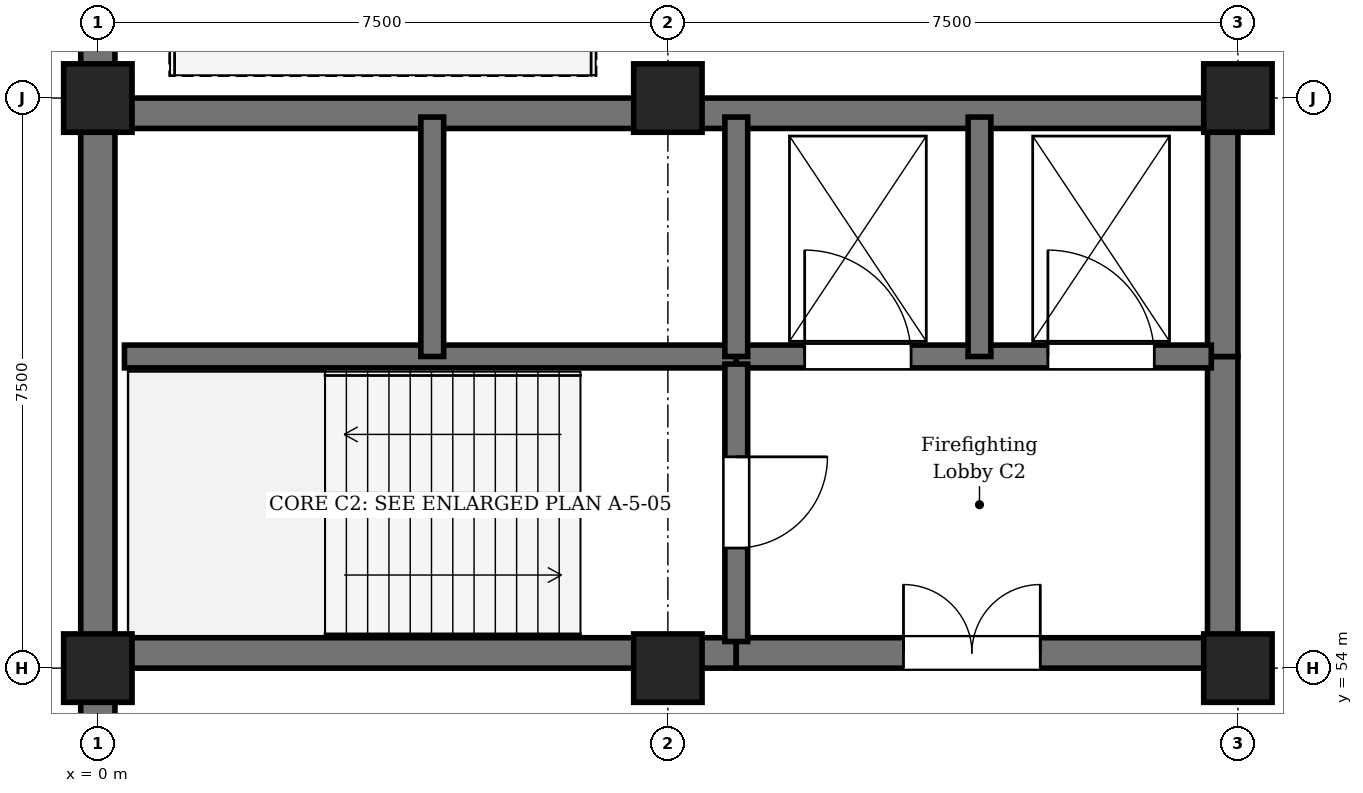
"""IFC4 building model, lengths in metres.
Left out: names, types, materials, properties, quantities, classifications, styles, units other than length and angle.
Written with IfcOpenShell. Run it as: python <this file> out.ifc"""

import sys

from ifc_helpers import new_model, si_unit, direction, frame, frame_2d, origin, origin_2d, place, context, subcontext, project, spatial, rectangle, circle, extrude, element, fill, save


model = new_model("IFC4")
c1 = context("Model", 3, precision=1e-05, world=origin(), true_north=direction((0.0, 1.0)))
c2 = subcontext(c1, "Body", "Model", "MODEL_VIEW")
j1 = project(units=[si_unit("LENGTHUNIT", "METRE"), si_unit("PLANEANGLEUNIT", "RADIAN")], contexts=[c1])
p1 = place(None, origin())
s1 = spatial("IfcSite", under=j1, at=p1, CompositionType="ELEMENT")
p2 = place(p1, origin())
s2 = spatial("IfcBuilding", under=s1, at=p2, CompositionType="ELEMENT")
p3 = place(p2, frame((0.0, 0.0, -4.5)))
s3 = spatial("IfcBuildingStorey", under=s2, at=p3, CompositionType="ELEMENT", Elevation=-4.5)
for number, where, z_axis, x_axis in (
    (1, (0.0, 54.0, 0.0), (0.0, 0.0, 1.0), (1.0, 0.0, 0.0)),
    (2, (0.0, 61.5, 0.0), (0.0, 0.0, 1.0), (1.0, 0.0, 0.0)),
    (3, (7.5, 54.0, 0.0), (0.0, 0.0, 1.0), (1.0, 0.0, 0.0)),
):
    element("IfcColumn", number, at=place(p3, frame(where, z_axis=z_axis, x_axis=x_axis)), inside=s3, PredefinedType="COLUMN", context=c2, shape_type="SweptSolid", body=[
        extrude(rectangle(XDim=0.9, YDim=0.9, at=origin_2d()), origin(), (0.0, 0.0, 1.0), 4.5),
    ])
for number, where, z_axis, x_axis in (
    (4, (7.5, 61.5, 0.0), (0.0, 0.0, 1.0), (1.0, 0.0, 0.0)),
    (5, (15.0, 54.0, 0.0), (0.0, 0.0, 1.0), (1.0, 0.0, 0.0)),
):
    element("IfcColumn", number, at=place(p3, frame(where, z_axis=z_axis, x_axis=x_axis)), inside=s3, PredefinedType="COLUMN", context=c2, shape_type="SweptSolid", body=[
        extrude(circle(Radius=0.45, at=origin_2d()), origin(), (0.0, 0.0, 1.0), 4.5),
    ])
p4 = place(p3, frame((15.0, 61.5, 0.0), z_axis=(0.0, 0.0, 1.0), x_axis=(1.0, 0.0, 0.0)))
e6 = element("IfcColumn", 6, at=p4, inside=s3, PredefinedType="COLUMN", context=c2, shape_type="SweptSolid", body=[
    extrude(rectangle(XDim=0.9, YDim=0.9, at=origin_2d()), origin(), (0.0, 0.0, 1.0), 4.5),
])
for number, where, z_axis, x_axis in (
    (7, (0.0, 46.5, 0.0), (0.0, 0.0, 1.0), (0.0, 1.0, 0.0)),
    (8, (0.0, 54.0, 0.0), (0.0, 0.0, 1.0), (0.0, 1.0, 0.0)),
    (9, (0.0, 61.5, 0.0), (0.0, 0.0, 1.0), (0.0, 1.0, 0.0)),
):
    element("IfcWall", number, at=place(p3, frame(where, z_axis=z_axis, x_axis=x_axis)), inside=s3, PredefinedType="SOLIDWALL", context=c2, shape_type="SweptSolid", body=[
        extrude(rectangle(XDim=7.5, YDim=0.45, at=frame_2d((3.75, 0.0))), origin(), (0.0, 0.0, 1.0), 4.14),
    ])
p5 = place(p3, frame((0.35, 54.2, 0.0), z_axis=(0.0, 0.0, 1.0), x_axis=(1.0, 0.0, 0.0)))
e10 = element("IfcWall", 10, at=p5, inside=s3, PredefinedType="SHEAR", context=c2, shape_type="SweptSolid", body=[
    extrude(rectangle(XDim=8.05, YDim=0.4, at=frame_2d((4.025, 0.0))), origin(), (0.0, 0.0, 1.0), 4.14),
])
p6 = place(p3, frame((8.4, 54.2, 0.0), z_axis=(0.0, 0.0, 1.0), x_axis=(1.0, 0.0, 0.0)))
e11 = element("IfcWall", 11, at=p6, inside=s3, PredefinedType="SHEAR", context=c2, shape_type="SweptSolid", body=[
    extrude(rectangle(XDim=6.25, YDim=0.4, at=frame_2d((3.125, 0.0))), origin(), (0.0, 0.0, 1.0), 4.14),
])
p7 = place(p6, frame((2.2, 0.0, 0.0)))
e12 = element("IfcOpeningElement", 12, at=p7, cuts=e11, PredefinedType="OPENING", context=c2, shape_type="SweptSolid", body=[
    extrude(rectangle(XDim=1.8, YDim=2.25, at=frame_2d((0.9, 1.125))), frame((0.0, 0.21, 0.0), z_axis=(0.0, -1.0, 0.0), x_axis=(1.0, 0.0, 0.0)), (0.0, 0.0, 1.0), 0.42),
])
p8 = place(p3, frame((0.35, 61.3, 0.0), z_axis=(0.0, 0.0, 1.0), x_axis=(1.0, 0.0, 0.0)))
e13 = element("IfcWall", 13, at=p8, inside=s3, PredefinedType="SHEAR", context=c2, shape_type="SweptSolid", body=[
    extrude(rectangle(XDim=14.3, YDim=0.4, at=frame_2d((7.15, 0.0))), origin(), (0.0, 0.0, 1.0), 4.14),
])
p9 = place(p3, frame((14.8, 54.35, 0.0), z_axis=(0.0, 0.0, 1.0), x_axis=(0.0, 1.0, 0.0)))
e14 = element("IfcWall", 14, at=p9, inside=s3, PredefinedType="SHEAR", context=c2, shape_type="SweptSolid", body=[
    extrude(rectangle(XDim=3.75, YDim=0.4, at=frame_2d((1.875, 0.0))), origin(), (0.0, 0.0, 1.0), 4.14),
])
p10 = place(p3, frame((14.8, 58.1, 0.0), z_axis=(0.0, 0.0, 1.0), x_axis=(0.0, 1.0, 0.0)))
e15 = element("IfcWall", 15, at=p10, inside=s3, PredefinedType="SHEAR", context=c2, shape_type="SweptSolid", body=[
    extrude(rectangle(XDim=3.05, YDim=0.4, at=frame_2d((1.525, 0.0))), origin(), (0.0, 0.0, 1.0), 4.14),
])
p11 = place(p3, frame((0.35, 58.1, 0.0), z_axis=(0.0, 0.0, 1.0), x_axis=(1.0, 0.0, 0.0)))
e16 = element("IfcWall", 16, at=p11, inside=s3, PredefinedType="SHEAR", context=c2, shape_type="SweptSolid", body=[
    extrude(rectangle(XDim=8.05, YDim=0.3, at=frame_2d((4.025, 0.0))), origin(), (0.0, 0.0, 1.0), 4.14),
])
p12 = place(p3, frame((8.4, 58.1, 0.0), z_axis=(0.0, 0.0, 1.0), x_axis=(1.0, 0.0, 0.0)))
e17 = element("IfcWall", 17, at=p12, inside=s3, PredefinedType="SHEAR", context=c2, shape_type="SweptSolid", body=[
    extrude(rectangle(XDim=6.25, YDim=0.3, at=frame_2d((3.125, 0.0))), origin(), (0.0, 0.0, 1.0), 4.14),
])
p13 = place(p12, frame((0.9, 0.0, 0.0)))
e18 = element("IfcOpeningElement", 18, at=p13, cuts=e17, PredefinedType="OPENING", context=c2, shape_type="SweptSolid", body=[
    extrude(rectangle(XDim=1.4, YDim=2.25, at=frame_2d((0.7, 1.125))), frame((0.0, 0.16, 0.0), z_axis=(0.0, -1.0, 0.0), x_axis=(1.0, 0.0, 0.0)), (0.0, 0.0, 1.0), 0.32),
])
p14 = place(p12, frame((4.1, 0.0, 0.0)))
e19 = element("IfcOpeningElement", 19, at=p14, cuts=e17, PredefinedType="OPENING", context=c2, shape_type="SweptSolid", body=[
    extrude(rectangle(XDim=1.4, YDim=2.25, at=frame_2d((0.7, 1.125))), frame((0.0, 0.16, 0.0), z_axis=(0.0, -1.0, 0.0), x_axis=(1.0, 0.0, 0.0)), (0.0, 0.0, 1.0), 0.32),
])
p15 = place(p3, frame((8.4, 58.0, 0.0), z_axis=(0.0, 0.0, 1.0), x_axis=(0.0, -1.0, 0.0)))
e20 = element("IfcWall", 20, at=p15, inside=s3, PredefinedType="SHEAR", context=c2, shape_type="SweptSolid", body=[
    extrude(rectangle(XDim=3.65, YDim=0.3, at=frame_2d((1.825, 0.0))), origin(), (0.0, 0.0, 1.0), 4.14),
])
p16 = place(p15, frame((1.22, 0.0, 0.0)))
e21 = element("IfcOpeningElement", 21, at=p16, cuts=e20, PredefinedType="OPENING", context=c2, shape_type="SweptSolid", body=[
    extrude(rectangle(XDim=1.2, YDim=2.25, at=frame_2d((0.6, 1.125))), frame((0.0, 0.16, 0.0), z_axis=(0.0, -1.0, 0.0), x_axis=(1.0, 0.0, 0.0)), (0.0, 0.0, 1.0), 0.32),
])
for number, where, z_axis, x_axis in (
    (22, (4.4, 58.1, 0.0), (0.0, 0.0, 1.0), (0.0, 1.0, 0.0)),
    (23, (8.4, 58.1, 0.0), (0.0, 0.0, 1.0), (0.0, 1.0, 0.0)),
    (24, (11.6, 58.1, 0.0), (0.0, 0.0, 1.0), (0.0, 1.0, 0.0)),
):
    element("IfcWall", number, at=place(p3, frame(where, z_axis=z_axis, x_axis=x_axis)), inside=s3, PredefinedType="SHEAR", context=c2, shape_type="SweptSolid", body=[
        extrude(rectangle(XDim=3.15, YDim=0.3, at=frame_2d((1.575, 0.0))), origin(), (0.0, 0.0, 1.0), 4.14),
    ])
p17 = place(p7, origin())
e25 = element("IfcDoor", 25, at=p17, inside=s3, OperationType="DOUBLE_DOOR_SINGLE_SWING", PredefinedType="DOOR", context=c2, shape_type="SweptSolid", body=[
    extrude(rectangle(XDim=1.8, YDim=2.25, at=frame_2d((0.9, 1.125))), frame((0.0, 0.025, 0.0), z_axis=(0.0, -1.0, 0.0), x_axis=(1.0, 0.0, 0.0)), (0.0, 0.0, 1.0), 0.05),
])
fill(e12, e25)
p18 = place(p13, origin())
e26 = element("IfcDoor", 26, at=p18, inside=s3, OperationType="DOUBLE_DOOR_SLIDING", PredefinedType="DOOR", context=c2, shape_type="SweptSolid", body=[
    extrude(rectangle(XDim=1.4, YDim=2.25, at=frame_2d((0.7, 1.125))), frame((0.0, 0.025, 0.0), z_axis=(0.0, -1.0, 0.0), x_axis=(1.0, 0.0, 0.0)), (0.0, 0.0, 1.0), 0.05),
])
fill(e18, e26)
p19 = place(p14, origin())
e27 = element("IfcDoor", 27, at=p19, inside=s3, OperationType="DOUBLE_DOOR_SLIDING", PredefinedType="DOOR", context=c2, shape_type="SweptSolid", body=[
    extrude(rectangle(XDim=1.4, YDim=2.25, at=frame_2d((0.7, 1.125))), frame((0.0, 0.025, 0.0), z_axis=(0.0, -1.0, 0.0), x_axis=(1.0, 0.0, 0.0)), (0.0, 0.0, 1.0), 0.05),
])
fill(e19, e27)
p20 = place(p16, origin())
e28 = element("IfcDoor", 28, at=p20, inside=s3, OperationType="SINGLE_SWING_LEFT", PredefinedType="DOOR", context=c2, shape_type="SweptSolid", body=[
    extrude(rectangle(XDim=1.2, YDim=2.25, at=frame_2d((0.6, 1.125))), frame((0.0, 0.025, 0.0), z_axis=(0.0, -1.0, 0.0), x_axis=(1.0, 0.0, 0.0)), (0.0, 0.0, 1.0), 0.05),
])
fill(e21, e28)
save(model, sys.argv[1])
